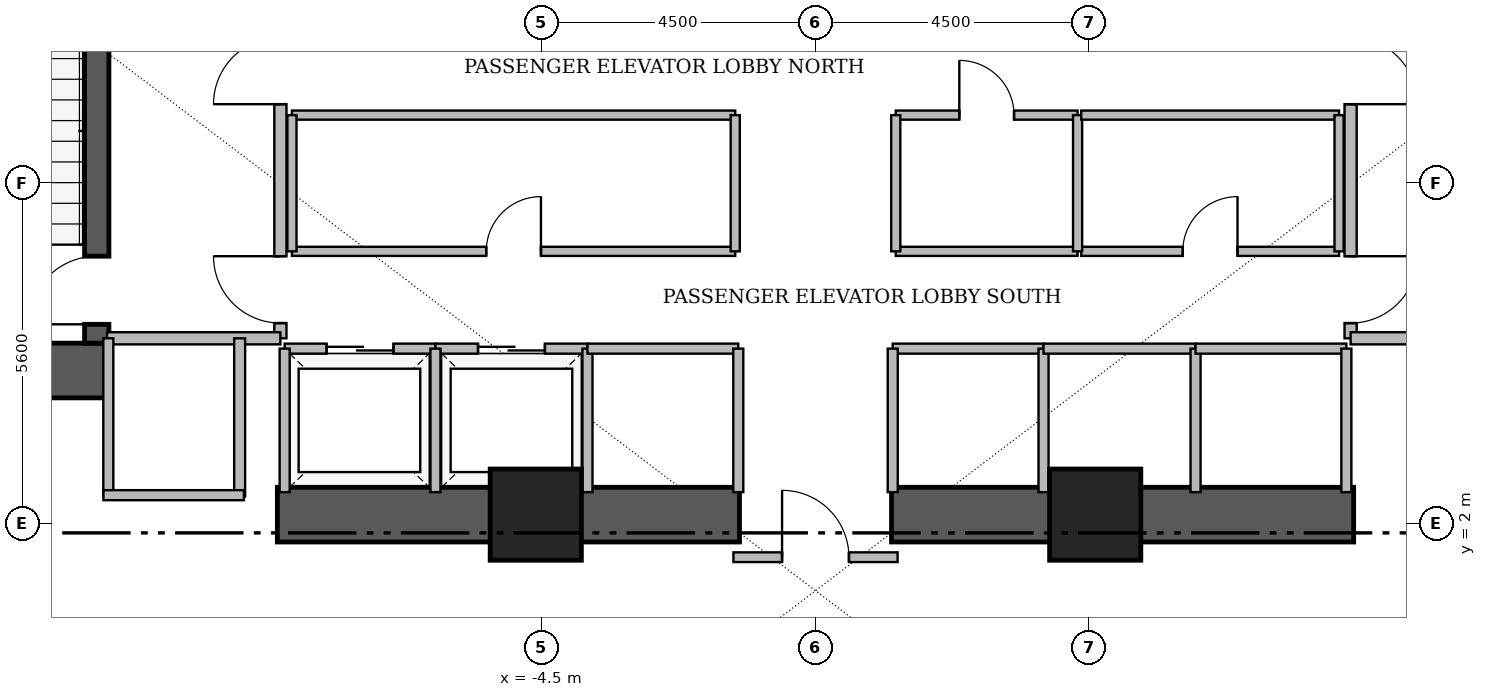
"""IFC4 building model, lengths in metres.
Left out: names, types, materials, properties, quantities, classifications, styles, units other than length and angle.
Written with IfcOpenShell. Run it as: python <this file> out.ifc"""

import sys

from ifc_helpers import new_model, si_unit, direction, frame, frame_2d, origin, origin_2d, place, context, subcontext, project, spatial, rectangle, extrude, element, fill, save


model = new_model("IFC4")
c1 = context("Model", 3, precision=1e-05, world=origin(), true_north=direction((0.0, 1.0)))
c2 = subcontext(c1, "Body", "Model", "MODEL_VIEW")
j1 = project(units=[si_unit("LENGTHUNIT", "METRE"), si_unit("PLANEANGLEUNIT", "RADIAN")], contexts=[c1])
p1 = place(None, origin())
s1 = spatial("IfcSite", under=j1, at=p1, CompositionType="ELEMENT")
p2 = place(p1, origin())
s2 = spatial("IfcBuilding", under=s1, at=p2, CompositionType="ELEMENT")
p3 = place(p2, frame((0.0, 0.0, -9.0)))
s3 = spatial("IfcBuildingStorey", under=s2, at=p3, CompositionType="ELEMENT", Elevation=-9.0)
p4 = place(p3, frame((-16.31, 4.52, 0.0), z_axis=(0.0, 0.0, 1.0), x_axis=(1.0, 0.0, 0.0)))
e1 = element("IfcWall", 1, at=p4, inside=s3, PredefinedType="SHEAR", context=c2, shape_type="SweptSolid", body=[
    extrude(rectangle(XDim=4.71, YDim=0.9, at=frame_2d((2.355, 0.0))), origin(), (0.0, 0.0, 1.0), 4.31),
])
for number, where, z_axis, x_axis in (
    (2, (-8.85, 2.15, 0.0), (0.0, 0.0, 1.0), (1.0, 0.0, 0.0)),
    (3, (1.25, 2.15, 0.0), (0.0, 0.0, 1.0), (1.0, 0.0, 0.0)),
):
    element("IfcWall", number, at=place(p3, frame(where, z_axis=z_axis, x_axis=x_axis)), inside=s3, PredefinedType="SHEAR", context=c2, shape_type="SweptSolid", body=[
        extrude(rectangle(XDim=7.6, YDim=0.9, at=frame_2d((3.8, 0.0))), origin(), (0.0, 0.0, 1.0), 4.24),
    ])
p5 = place(p3, frame((-11.82, 4.97, 0.0), z_axis=(0.0, 0.0, 1.0), x_axis=(0.0, 1.0, 0.0)))
e4 = element("IfcWall", 4, at=p5, inside=s3, PredefinedType="SHEAR", context=c2, shape_type="SweptSolid", body=[
    extrude(rectangle(XDim=8.96, YDim=0.4, at=frame_2d((4.48, 0.0))), origin(), (0.0, 0.0, 1.0), 4.31),
])
p6 = place(p5, frame((0.31, 0.0, 0.0)))
e5 = element("IfcOpeningElement", 5, at=p6, cuts=e4, PredefinedType="OPENING", context=c2, shape_type="SweptSolid", body=[
    extrude(rectangle(XDim=1.12, YDim=2.22, at=frame_2d((0.56, 1.11))), frame((0.0, 0.21, 0.0), z_axis=(0.0, -1.0, 0.0), x_axis=(1.0, 0.0, 0.0)), (0.0, 0.0, 1.0), 0.42),
])
for number, where, z_axis, x_axis in (
    (6, (-4.6, 2.15, 0.0), (0.0, 0.0, 1.0), (1.0, 0.0, 0.0)),
    (7, (4.6, 2.15, 0.0), (0.0, 0.0, 1.0), (1.0, 0.0, 0.0)),
):
    element("IfcColumn", number, at=place(p3, frame(where, z_axis=z_axis, x_axis=x_axis)), inside=s3, PredefinedType="COLUMN", context=c2, shape_type="SweptSolid", body=[
        extrude(rectangle(XDim=1.5, YDim=1.5, at=origin_2d()), origin(), (0.0, 0.0, 1.0), 4.5),
    ])
p7 = place(p3, frame((-8.8, 5.05, 0.0), z_axis=(0.0, 0.0, 1.0), x_axis=(0.0, 1.0, 0.0)))
e8 = element("IfcWall", 8, at=p7, inside=s3, PredefinedType="PARTITIONING", context=c2, shape_type="SweptSolid", body=[
    extrude(rectangle(XDim=6.1, YDim=0.2, at=frame_2d((3.05, 0.0))), origin(), (0.0, 0.0, 1.0), 4.24),
])
p8 = place(p7, frame((0.25, 0.0, 0.0)))
e9 = element("IfcOpeningElement", 9, at=p8, cuts=e8, PredefinedType="OPENING", context=c2, shape_type="SweptSolid", body=[
    extrude(rectangle(XDim=1.1, YDim=2.2, at=frame_2d((0.55, 1.1))), frame((0.0, 0.11, 0.0), z_axis=(0.0, -1.0, 0.0), x_axis=(1.0, 0.0, 0.0)), (0.0, 0.0, 1.0), 0.22),
])
p9 = place(p7, frame((3.85, 0.0, 0.0)))
e10 = element("IfcOpeningElement", 10, at=p9, cuts=e8, PredefinedType="OPENING", context=c2, shape_type="SweptSolid", body=[
    extrude(rectangle(XDim=1.1, YDim=2.2, at=frame_2d((0.55, 1.1))), frame((0.0, 0.11, 0.0), z_axis=(0.0, -1.0, 0.0), x_axis=(1.0, 0.0, 0.0)), (0.0, 0.0, 1.0), 0.22),
])
p10 = place(p3, frame((8.8, 11.15, 0.0), z_axis=(0.0, 0.0, 1.0), x_axis=(0.0, -1.0, 0.0)))
e11 = element("IfcWall", 11, at=p10, inside=s3, PredefinedType="PARTITIONING", context=c2, shape_type="SweptSolid", body=[
    extrude(rectangle(XDim=6.1, YDim=0.2, at=frame_2d((3.05, 0.0))), origin(), (0.0, 0.0, 1.0), 4.24),
])
p11 = place(p10, frame((1.15, 0.0, 0.0)))
e12 = element("IfcOpeningElement", 12, at=p11, cuts=e11, PredefinedType="OPENING", context=c2, shape_type="SweptSolid", body=[
    extrude(rectangle(XDim=1.1, YDim=2.2, at=frame_2d((0.55, 1.1))), frame((0.0, 0.11, 0.0), z_axis=(0.0, -1.0, 0.0), x_axis=(1.0, 0.0, 0.0)), (0.0, 0.0, 1.0), 0.22),
])
p12 = place(p10, frame((4.75, 0.0, 0.0)))
e13 = element("IfcOpeningElement", 13, at=p12, cuts=e11, PredefinedType="OPENING", context=c2, shape_type="SweptSolid", body=[
    extrude(rectangle(XDim=1.1, YDim=2.2, at=frame_2d((0.55, 1.1))), frame((0.0, 0.11, 0.0), z_axis=(0.0, -1.0, 0.0), x_axis=(1.0, 0.0, 0.0)), (0.0, 0.0, 1.0), 0.22),
])
p13 = place(p3, frame((-8.73, 4.88, 0.0), z_axis=(0.0, 0.0, 1.0), x_axis=(1.0, 0.0, 0.0)))
e14 = element("IfcWall", 14, at=p13, inside=s3, PredefinedType="PARTITIONING", context=c2, shape_type="SweptSolid", body=[
    extrude(rectangle(XDim=2.48, YDim=0.165, at=frame_2d((1.24, 0.0))), origin(), (0.0, 0.0, 1.0), 4.24),
])
p14 = place(p13, frame((0.69, 0.0, 0.0)))
e15 = element("IfcOpeningElement", 15, at=p14, cuts=e14, PredefinedType="OPENING", context=c2, shape_type="SweptSolid", body=[
    extrude(rectangle(XDim=1.1, YDim=2.25, at=frame_2d((0.55, 1.125))), frame((0.0, 0.093, 0.0), z_axis=(0.0, -1.0, 0.0), x_axis=(1.0, 0.0, 0.0)), (0.0, 0.0, 1.0), 0.185),
])
p15 = place(p3, frame((-6.25, 4.88, 0.0), z_axis=(0.0, 0.0, 1.0), x_axis=(1.0, 0.0, 0.0)))
e16 = element("IfcWall", 16, at=p15, inside=s3, PredefinedType="PARTITIONING", context=c2, shape_type="SweptSolid", body=[
    extrude(rectangle(XDim=2.5, YDim=0.165, at=frame_2d((1.25, 0.0))), origin(), (0.0, 0.0, 1.0), 4.24),
])
p16 = place(p15, frame((0.7, 0.0, 0.0)))
e17 = element("IfcOpeningElement", 17, at=p16, cuts=e16, PredefinedType="OPENING", context=c2, shape_type="SweptSolid", body=[
    extrude(rectangle(XDim=1.1, YDim=2.25, at=frame_2d((0.55, 1.125))), frame((0.0, 0.093, 0.0), z_axis=(0.0, -1.0, 0.0), x_axis=(1.0, 0.0, 0.0)), (0.0, 0.0, 1.0), 0.185),
])
p17 = place(p3, frame((-8.61, 6.48, 0.0), z_axis=(0.0, 0.0, 1.0), x_axis=(1.0, 0.0, 0.0)))
e18 = element("IfcWall", 18, at=p17, inside=s3, PredefinedType="PARTITIONING", context=c2, shape_type="SweptSolid", body=[
    extrude(rectangle(XDim=7.29, YDim=0.15, at=frame_2d((3.645, 0.0))), origin(), (0.0, 0.0, 1.0), 4.24),
])
p18 = place(p17, frame((3.195, 0.0, 0.0)))
e19 = element("IfcOpeningElement", 19, at=p18, cuts=e18, PredefinedType="OPENING", context=c2, shape_type="SweptSolid", body=[
    extrude(rectangle(XDim=0.9, YDim=2.15, at=frame_2d((0.45, 1.075))), frame((0.0, 0.085, 0.0), z_axis=(0.0, -1.0, 0.0), x_axis=(1.0, 0.0, 0.0)), (0.0, 0.0, 1.0), 0.17),
])
p19 = place(p3, frame((1.32, 8.72, 0.0), z_axis=(0.0, 0.0, 1.0), x_axis=(1.0, 0.0, 0.0)))
e20 = element("IfcWall", 20, at=p19, inside=s3, PredefinedType="PARTITIONING", context=c2, shape_type="SweptSolid", body=[
    extrude(rectangle(XDim=2.99, YDim=0.15, at=frame_2d((1.495, 0.0))), origin(), (0.0, 0.0, 1.0), 4.24),
])
p20 = place(p19, frame((1.045, 0.0, 0.0)))
e21 = element("IfcOpeningElement", 21, at=p20, cuts=e20, PredefinedType="OPENING", context=c2, shape_type="SweptSolid", body=[
    extrude(rectangle(XDim=0.9, YDim=2.15, at=frame_2d((0.45, 1.075))), frame((0.0, 0.085, 0.0), z_axis=(0.0, -1.0, 0.0), x_axis=(1.0, 0.0, 0.0)), (0.0, 0.0, 1.0), 0.17),
])
p21 = place(p3, frame((4.37, 6.48, 0.0), z_axis=(0.0, 0.0, 1.0), x_axis=(1.0, 0.0, 0.0)))
e22 = element("IfcWall", 22, at=p21, inside=s3, PredefinedType="PARTITIONING", context=c2, shape_type="SweptSolid", body=[
    extrude(rectangle(XDim=4.24, YDim=0.15, at=frame_2d((2.12, 0.0))), origin(), (0.0, 0.0, 1.0), 4.24),
])
p22 = place(p21, frame((1.67, 0.0, 0.0)))
e23 = element("IfcOpeningElement", 23, at=p22, cuts=e22, PredefinedType="OPENING", context=c2, shape_type="SweptSolid", body=[
    extrude(rectangle(XDim=0.9, YDim=2.15, at=frame_2d((0.45, 1.075))), frame((0.0, 0.085, 0.0), z_axis=(0.0, -1.0, 0.0), x_axis=(1.0, 0.0, 0.0)), (0.0, 0.0, 1.0), 0.17),
])
p23 = place(p3, frame((-1.35, 1.45, 0.0), z_axis=(0.0, 0.0, 1.0), x_axis=(1.0, 0.0, 0.0)))
e24 = element("IfcWall", 24, at=p23, inside=s3, PredefinedType="PARTITIONING", context=c2, shape_type="SweptSolid", body=[
    extrude(rectangle(XDim=2.7, YDim=0.16, at=frame_2d((1.35, 0.0))), origin(), (0.0, 0.0, 1.0), 4.24),
])
p24 = place(p23, frame((0.8, 0.0, 0.0)))
e25 = element("IfcOpeningElement", 25, at=p24, cuts=e24, PredefinedType="OPENING", context=c2, shape_type="SweptSolid", body=[
    extrude(rectangle(XDim=1.1, YDim=2.2, at=frame_2d((0.55, 1.1))), frame((0.0, 0.09, 0.0), z_axis=(0.0, -1.0, 0.0), x_axis=(1.0, 0.0, 0.0)), (0.0, 0.0, 1.0), 0.18),
])
for number, where, z_axis, x_axis in (
    (26, (-11.65, 5.05, 0.0), (0.0, 0.0, 1.0), (1.0, 0.0, 0.0)),
    (27, (8.8, 5.05, 0.0), (0.0, 0.0, 1.0), (1.0, 0.0, 0.0)),
):
    element("IfcWall", number, at=place(p3, frame(where, z_axis=z_axis, x_axis=x_axis)), inside=s3, PredefinedType="PARTITIONING", context=c2, shape_type="SweptSolid", body=[
        extrude(rectangle(XDim=2.85, YDim=0.2, at=frame_2d((1.425, 0.0))), origin(), (0.0, 0.0, 1.0), 4.24),
    ])
for number, where, z_axis, x_axis in (
    (28, (-8.73, 2.52, 0.0), (0.0, 0.0, 1.0), (0.0, 1.0, 0.0)),
    (29, (-6.25, 2.52, 0.0), (0.0, 0.0, 1.0), (0.0, 1.0, 0.0)),
    (30, (-3.75, 2.52, 0.0), (0.0, 0.0, 1.0), (0.0, 1.0, 0.0)),
):
    element("IfcWall", number, at=place(p3, frame(where, z_axis=z_axis, x_axis=x_axis)), inside=s3, PredefinedType="PARTITIONING", context=c2, shape_type="SweptSolid", body=[
        extrude(rectangle(XDim=2.36, YDim=0.165, at=frame_2d((1.18, 0.0))), origin(), (0.0, 0.0, 1.0), 4.24),
    ])
p25 = place(p3, frame((-3.75, 4.88, 0.0), z_axis=(0.0, 0.0, 1.0), x_axis=(1.0, 0.0, 0.0)))
e31 = element("IfcWall", 31, at=p25, inside=s3, PredefinedType="PARTITIONING", context=c2, shape_type="SweptSolid", body=[
    extrude(rectangle(XDim=2.48, YDim=0.165, at=frame_2d((1.24, 0.0))), origin(), (0.0, 0.0, 1.0), 4.24),
])
p26 = place(p3, frame((-1.27, 2.52, 0.0), z_axis=(0.0, 0.0, 1.0), x_axis=(0.0, 1.0, 0.0)))
e32 = element("IfcWall", 32, at=p26, inside=s3, PredefinedType="PARTITIONING", context=c2, shape_type="SweptSolid", body=[
    extrude(rectangle(XDim=2.36, YDim=0.165, at=frame_2d((1.18, 0.0))), origin(), (0.0, 0.0, 1.0), 4.24),
])
p27 = place(p3, frame((1.27, 4.88, 0.0), z_axis=(0.0, 0.0, 1.0), x_axis=(1.0, 0.0, 0.0)))
e33 = element("IfcWall", 33, at=p27, inside=s3, PredefinedType="PARTITIONING", context=c2, shape_type="SweptSolid", body=[
    extrude(rectangle(XDim=2.48, YDim=0.165, at=frame_2d((1.24, 0.0))), origin(), (0.0, 0.0, 1.0), 4.24),
])
for number, where, z_axis, x_axis in (
    (34, (1.27, 2.52, 0.0), (0.0, 0.0, 1.0), (0.0, 1.0, 0.0)),
    (35, (3.75, 2.52, 0.0), (0.0, 0.0, 1.0), (0.0, 1.0, 0.0)),
):
    element("IfcWall", number, at=place(p3, frame(where, z_axis=z_axis, x_axis=x_axis)), inside=s3, PredefinedType="PARTITIONING", context=c2, shape_type="SweptSolid", body=[
        extrude(rectangle(XDim=2.36, YDim=0.165, at=frame_2d((1.18, 0.0))), origin(), (0.0, 0.0, 1.0), 4.24),
    ])
p28 = place(p3, frame((3.75, 4.88, 0.0), z_axis=(0.0, 0.0, 1.0), x_axis=(1.0, 0.0, 0.0)))
e36 = element("IfcWall", 36, at=p28, inside=s3, PredefinedType="PARTITIONING", context=c2, shape_type="SweptSolid", body=[
    extrude(rectangle(XDim=2.5, YDim=0.165, at=frame_2d((1.25, 0.0))), origin(), (0.0, 0.0, 1.0), 4.24),
])
p29 = place(p3, frame((6.25, 2.52, 0.0), z_axis=(0.0, 0.0, 1.0), x_axis=(0.0, 1.0, 0.0)))
e37 = element("IfcWall", 37, at=p29, inside=s3, PredefinedType="PARTITIONING", context=c2, shape_type="SweptSolid", body=[
    extrude(rectangle(XDim=2.36, YDim=0.165, at=frame_2d((1.18, 0.0))), origin(), (0.0, 0.0, 1.0), 4.24),
])
p30 = place(p3, frame((6.25, 4.88, 0.0), z_axis=(0.0, 0.0, 1.0), x_axis=(1.0, 0.0, 0.0)))
e38 = element("IfcWall", 38, at=p30, inside=s3, PredefinedType="PARTITIONING", context=c2, shape_type="SweptSolid", body=[
    extrude(rectangle(XDim=2.48, YDim=0.165, at=frame_2d((1.24, 0.0))), origin(), (0.0, 0.0, 1.0), 4.24),
])
p31 = place(p3, frame((8.73, 2.52, 0.0), z_axis=(0.0, 0.0, 1.0), x_axis=(0.0, 1.0, 0.0)))
e39 = element("IfcWall", 39, at=p31, inside=s3, PredefinedType="PARTITIONING", context=c2, shape_type="SweptSolid", body=[
    extrude(rectangle(XDim=2.36, YDim=0.165, at=frame_2d((1.18, 0.0))), origin(), (0.0, 0.0, 1.0), 4.24),
])
p32 = place(p3, frame((-9.47, 2.45, 0.0), z_axis=(0.0, 0.0, 1.0), x_axis=(0.0, 1.0, 0.0)))
e40 = element("IfcWall", 40, at=p32, inside=s3, PredefinedType="PARTITIONING", context=c2, shape_type="SweptSolid", body=[
    extrude(rectangle(XDim=2.6, YDim=0.18, at=frame_2d((1.3, 0.0))), origin(), (0.0, 0.0, 1.0), 4.24),
])
p33 = place(p3, frame((-11.63, 2.47, 0.0), z_axis=(0.0, 0.0, 1.0), x_axis=(0.0, 1.0, 0.0)))
e41 = element("IfcWall", 41, at=p33, inside=s3, PredefinedType="PARTITIONING", context=c2, shape_type="SweptSolid", body=[
    extrude(rectangle(XDim=2.58, YDim=0.165, at=frame_2d((1.29, 0.0))), origin(), (0.0, 0.0, 1.0), 4.24),
])
p34 = place(p3, frame((-11.71, 2.47, 0.0), z_axis=(0.0, 0.0, 1.0), x_axis=(1.0, 0.0, 0.0)))
e42 = element("IfcWall", 42, at=p34, inside=s3, PredefinedType="PARTITIONING", context=c2, shape_type="SweptSolid", body=[
    extrude(rectangle(XDim=2.31, YDim=0.165, at=frame_2d((1.155, 0.0))), origin(), (0.0, 0.0, 1.0), 2.84),
])
p35 = place(p3, frame((-8.61, 8.72, 0.0), z_axis=(0.0, 0.0, 1.0), x_axis=(1.0, 0.0, 0.0)))
e43 = element("IfcWall", 43, at=p35, inside=s3, PredefinedType="PARTITIONING", context=c2, shape_type="SweptSolid", body=[
    extrude(rectangle(XDim=7.29, YDim=0.15, at=frame_2d((3.645, 0.0))), origin(), (0.0, 0.0, 1.0), 4.24),
])
for number, where, z_axis, x_axis in (
    (44, (-8.61, 6.48, 0.0), (0.0, 0.0, 1.0), (0.0, 1.0, 0.0)),
    (45, (-1.32, 6.48, 0.0), (0.0, 0.0, 1.0), (0.0, 1.0, 0.0)),
):
    element("IfcWall", number, at=place(p3, frame(where, z_axis=z_axis, x_axis=x_axis)), inside=s3, PredefinedType="PARTITIONING", context=c2, shape_type="SweptSolid", body=[
        extrude(rectangle(XDim=2.24, YDim=0.15, at=frame_2d((1.12, 0.0))), origin(), (0.0, 0.0, 1.0), 4.24),
    ])
p36 = place(p3, frame((1.32, 6.48, 0.0), z_axis=(0.0, 0.0, 1.0), x_axis=(1.0, 0.0, 0.0)))
e46 = element("IfcWall", 46, at=p36, inside=s3, PredefinedType="PARTITIONING", context=c2, shape_type="SweptSolid", body=[
    extrude(rectangle(XDim=2.99, YDim=0.15, at=frame_2d((1.495, 0.0))), origin(), (0.0, 0.0, 1.0), 4.24),
])
for number, where, z_axis, x_axis in (
    (47, (1.32, 6.48, 0.0), (0.0, 0.0, 1.0), (0.0, 1.0, 0.0)),
    (48, (4.31, 6.48, 0.0), (0.0, 0.0, 1.0), (0.0, 1.0, 0.0)),
):
    element("IfcWall", number, at=place(p3, frame(where, z_axis=z_axis, x_axis=x_axis)), inside=s3, PredefinedType="PARTITIONING", context=c2, shape_type="SweptSolid", body=[
        extrude(rectangle(XDim=2.24, YDim=0.15, at=frame_2d((1.12, 0.0))), origin(), (0.0, 0.0, 1.0), 4.24),
    ])
p37 = place(p3, frame((4.37, 8.72, 0.0), z_axis=(0.0, 0.0, 1.0), x_axis=(1.0, 0.0, 0.0)))
e49 = element("IfcWall", 49, at=p37, inside=s3, PredefinedType="PARTITIONING", context=c2, shape_type="SweptSolid", body=[
    extrude(rectangle(XDim=4.24, YDim=0.15, at=frame_2d((2.12, 0.0))), origin(), (0.0, 0.0, 1.0), 4.24),
])
p38 = place(p3, frame((8.61, 6.48, 0.0), z_axis=(0.0, 0.0, 1.0), x_axis=(0.0, 1.0, 0.0)))
e50 = element("IfcWall", 50, at=p38, inside=s3, PredefinedType="PARTITIONING", context=c2, shape_type="SweptSolid", body=[
    extrude(rectangle(XDim=2.24, YDim=0.15, at=frame_2d((1.12, 0.0))), origin(), (0.0, 0.0, 1.0), 4.24),
])
p39 = place(p6, origin())
e51 = element("IfcDoor", 51, at=p39, inside=s3, OperationType="SINGLE_SWING_LEFT", PredefinedType="DOOR", context=c2, shape_type="SweptSolid", body=[
    extrude(rectangle(XDim=1.12, YDim=2.22, at=frame_2d((0.56, 1.11))), frame((0.0, 0.025, 0.0), z_axis=(0.0, -1.0, 0.0), x_axis=(1.0, 0.0, 0.0)), (0.0, 0.0, 1.0), 0.05),
])
fill(e5, e51)
p40 = place(p8, origin())
e52 = element("IfcDoor", 52, at=p40, inside=s3, OperationType="SINGLE_SWING_RIGHT", PredefinedType="DOOR", context=c2, shape_type="SweptSolid", body=[
    extrude(rectangle(XDim=1.1, YDim=2.2, at=frame_2d((0.55, 1.1))), frame((0.0, 0.025, 0.0), z_axis=(0.0, -1.0, 0.0), x_axis=(1.0, 0.0, 0.0)), (0.0, 0.0, 1.0), 0.05),
])
fill(e9, e52)
p41 = place(p9, origin())
e53 = element("IfcDoor", 53, at=p41, inside=s3, OperationType="SINGLE_SWING_LEFT", PredefinedType="DOOR", context=c2, shape_type="SweptSolid", body=[
    extrude(rectangle(XDim=1.1, YDim=2.2, at=frame_2d((0.55, 1.1))), frame((0.0, 0.025, 0.0), z_axis=(0.0, -1.0, 0.0), x_axis=(1.0, 0.0, 0.0)), (0.0, 0.0, 1.0), 0.05),
])
fill(e10, e53)
p42 = place(p11, origin())
e54 = element("IfcDoor", 54, at=p42, inside=s3, OperationType="SINGLE_SWING_RIGHT", PredefinedType="DOOR", context=c2, shape_type="SweptSolid", body=[
    extrude(rectangle(XDim=1.1, YDim=2.2, at=frame_2d((0.55, 1.1))), frame((0.0, 0.025, 0.0), z_axis=(0.0, -1.0, 0.0), x_axis=(1.0, 0.0, 0.0)), (0.0, 0.0, 1.0), 0.05),
])
fill(e12, e54)
p43 = place(p12, origin())
e55 = element("IfcDoor", 55, at=p43, inside=s3, OperationType="SINGLE_SWING_LEFT", PredefinedType="DOOR", context=c2, shape_type="SweptSolid", body=[
    extrude(rectangle(XDim=1.1, YDim=2.2, at=frame_2d((0.55, 1.1))), frame((0.0, 0.025, 0.0), z_axis=(0.0, -1.0, 0.0), x_axis=(1.0, 0.0, 0.0)), (0.0, 0.0, 1.0), 0.05),
])
fill(e13, e55)
p44 = place(p14, origin())
e56 = element("IfcDoor", 56, at=p44, inside=s3, OperationType="SLIDING_TO_LEFT", PredefinedType="DOOR", context=c2, shape_type="SweptSolid", body=[
    extrude(rectangle(XDim=1.1, YDim=2.25, at=frame_2d((0.55, 1.125))), frame((0.0, 0.025, 0.0), z_axis=(0.0, -1.0, 0.0), x_axis=(1.0, 0.0, 0.0)), (0.0, 0.0, 1.0), 0.05),
])
fill(e15, e56)
p45 = place(p16, origin())
e57 = element("IfcDoor", 57, at=p45, inside=s3, OperationType="SLIDING_TO_LEFT", PredefinedType="DOOR", context=c2, shape_type="SweptSolid", body=[
    extrude(rectangle(XDim=1.1, YDim=2.25, at=frame_2d((0.55, 1.125))), frame((0.0, 0.025, 0.0), z_axis=(0.0, -1.0, 0.0), x_axis=(1.0, 0.0, 0.0)), (0.0, 0.0, 1.0), 0.05),
])
fill(e17, e57)
p46 = place(p18, origin())
e58 = element("IfcDoor", 58, at=p46, inside=s3, OperationType="SINGLE_SWING_RIGHT", PredefinedType="DOOR", context=c2, shape_type="SweptSolid", body=[
    extrude(rectangle(XDim=0.9, YDim=2.15, at=frame_2d((0.45, 1.075))), frame((0.0, 0.025, 0.0), z_axis=(0.0, -1.0, 0.0), x_axis=(1.0, 0.0, 0.0)), (0.0, 0.0, 1.0), 0.05),
])
fill(e19, e58)
p47 = place(p20, origin())
e59 = element("IfcDoor", 59, at=p47, inside=s3, OperationType="SINGLE_SWING_LEFT", PredefinedType="DOOR", context=c2, shape_type="SweptSolid", body=[
    extrude(rectangle(XDim=0.9, YDim=2.15, at=frame_2d((0.45, 1.075))), frame((0.0, 0.025, 0.0), z_axis=(0.0, -1.0, 0.0), x_axis=(1.0, 0.0, 0.0)), (0.0, 0.0, 1.0), 0.05),
])
fill(e21, e59)
p48 = place(p22, origin())
e60 = element("IfcDoor", 60, at=p48, inside=s3, OperationType="SINGLE_SWING_RIGHT", PredefinedType="DOOR", context=c2, shape_type="SweptSolid", body=[
    extrude(rectangle(XDim=0.9, YDim=2.15, at=frame_2d((0.45, 1.075))), frame((0.0, 0.025, 0.0), z_axis=(0.0, -1.0, 0.0), x_axis=(1.0, 0.0, 0.0)), (0.0, 0.0, 1.0), 0.05),
])
fill(e23, e60)
p49 = place(p24, origin())
e61 = element("IfcDoor", 61, at=p49, inside=s3, OperationType="SINGLE_SWING_LEFT", PredefinedType="DOOR", context=c2, shape_type="SweptSolid", body=[
    extrude(rectangle(XDim=1.1, YDim=2.2, at=frame_2d((0.55, 1.1))), frame((0.0, 0.025, 0.0), z_axis=(0.0, -1.0, 0.0), x_axis=(1.0, 0.0, 0.0)), (0.0, 0.0, 1.0), 0.05),
])
fill(e25, e61)
save(model, sys.argv[1])
